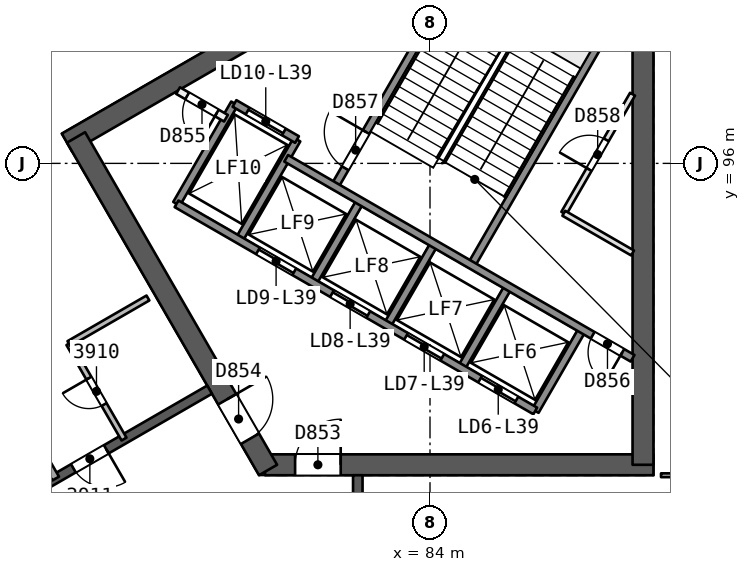
"""IFC4 building model, lengths in metres.
Left out: names, types, materials, properties, quantities, classifications, styles, units other than length and angle.
Written with IfcOpenShell. Run it as: python <this file> out.ifc"""

import sys

from ifc_helpers import new_model, si_unit, direction, frame, frame_2d, origin, place, context, subcontext, project, spatial, rectangle, extrude, element, fill, save


model = new_model("IFC4")
c1 = context("Model", 3, precision=1e-05, world=origin(), true_north=direction((0.0, 1.0)))
c2 = subcontext(c1, "Body", "Model", "MODEL_VIEW")
j1 = project(units=[si_unit("LENGTHUNIT", "METRE"), si_unit("PLANEANGLEUNIT", "RADIAN")], contexts=[c1])
p1 = place(None, origin())
s1 = spatial("IfcSite", under=j1, at=p1, CompositionType="ELEMENT")
p2 = place(p1, origin())
s2 = spatial("IfcBuilding", under=s1, at=p2, CompositionType="ELEMENT")
p3 = place(p2, frame((0.0, 0.0, 163.7)))
s3 = spatial("IfcBuildingStorey", under=s2, at=p3, CompositionType="ELEMENT", Elevation=163.7)
p4 = place(p3, frame((79.659, 88.069, 0.0), z_axis=(0.0, 0.0, 1.0), x_axis=(1.0, 0.0, 0.0)))
e1 = element("IfcWall", 1, at=p4, inside=s3, PredefinedType="SHEAR", context=c2, shape_type="SweptSolid", body=[
    extrude(rectangle(XDim=10.221, YDim=0.55, at=frame_2d((5.111, 0.0))), origin(), (0.0, 0.0, 1.0), 3.7),
])
p5 = place(p4, frame((0.791, 0.0, 0.0)))
e2 = element("IfcOpeningElement", 2, at=p5, cuts=e1, PredefinedType="OPENING", context=c2, shape_type="SweptSolid", body=[
    extrude(rectangle(XDim=1.2, YDim=2.1, at=frame_2d((0.6, 1.05))), frame((0.0, 0.286, 0.0), z_axis=(0.0, -1.0, 0.0), x_axis=(1.0, 0.0, 0.0)), (0.0, 0.0, 1.0), 0.571),
])
p6 = place(p3, frame((89.605, 88.069, 0.0), z_axis=(0.0, 0.0, 1.0), x_axis=(0.0, 1.0, 0.0)))
e3 = element("IfcWall", 3, at=p6, inside=s3, PredefinedType="SHEAR", context=c2, shape_type="SweptSolid", body=[
    extrude(rectangle(XDim=14.058, YDim=0.55, at=frame_2d((7.029, 0.0))), origin(), (0.0, 0.0, 1.0), 3.7),
])
p7 = place(p3, frame((86.723, 103.633, 0.0), z_axis=(0.0, 0.0, 1.0), x_axis=(-0.866023530946, -0.500003243837, 0.0)))
e4 = element("IfcWall", 4, at=p7, inside=s3, PredefinedType="SHEAR", context=c2, shape_type="SweptSolid", body=[
    extrude(rectangle(XDim=14.175, YDim=0.55, at=frame_2d((7.087, 0.0))), origin(), (0.0, 0.0, 1.0), 3.7),
])
p8 = place(p3, frame((74.686, 96.683, 0.0), z_axis=(0.0, 0.0, 1.0), x_axis=(0.499997818338, -0.866026663364, 0.0)))
e5 = element("IfcWall", 5, at=p8, inside=s3, PredefinedType="SHEAR", context=c2, shape_type="SweptSolid", body=[
    extrude(rectangle(XDim=10.105, YDim=0.55, at=frame_2d((5.052, 0.0))), origin(), (0.0, 0.0, 1.0), 3.7),
])
p9 = place(p8, frame((7.955, 0.0, 0.0)))
e6 = element("IfcOpeningElement", 6, at=p9, cuts=e5, PredefinedType="OPENING", context=c2, shape_type="SweptSolid", body=[
    extrude(rectangle(XDim=1.2, YDim=2.1, at=frame_2d((0.6, 1.05))), frame((0.0, 0.286, 0.0), z_axis=(0.0, -1.0, 0.0), x_axis=(1.0, 0.0, 0.0)), (0.0, 0.0, 1.0), 0.571),
])
p10 = place(p3, frame((82.1, 72.206, 0.0), z_axis=(0.0, 0.0, 1.0), x_axis=(0.0, 1.0, 0.0)))
e7 = element("IfcWall", 7, at=p10, inside=s3, PredefinedType="SHEAR", context=c2, shape_type="SweptSolid", body=[
    extrude(rectangle(XDim=15.588, YDim=0.25, at=frame_2d((7.794, 0.0))), origin(), (0.0, 0.0, 1.0), 3.25),
])
p11 = place(p10, frame((2.618, 0.0, 0.0)))
e8 = element("IfcOpeningElement", 8, at=p11, cuts=e7, PredefinedType="OPENING", context=c2, shape_type="SweptSolid", body=[
    extrude(rectangle(XDim=1.0, YDim=2.1, at=frame_2d((0.5, 1.05))), frame((0.0, 0.135, 0.0), z_axis=(0.0, -1.0, 0.0), x_axis=(1.0, 0.0, 0.0)), (0.0, 0.0, 1.0), 0.271),
])
p12 = place(p10, frame((8.285, 0.0, 0.0)))
e9 = element("IfcOpeningElement", 9, at=p12, cuts=e7, PredefinedType="OPENING", context=c2, shape_type="SweptSolid", body=[
    extrude(rectangle(XDim=1.2, YDim=2.4, at=frame_2d((0.6, 1.2))), frame((0.0, 0.135, 0.0), z_axis=(0.0, -1.0, 0.0), x_axis=(1.0, 0.0, 0.0)), (0.0, 0.0, 1.0), 0.271),
])
p13 = place(p10, frame((13.062, 0.0, 0.0)))
e10 = element("IfcOpeningElement", 10, at=p13, cuts=e7, PredefinedType="OPENING", context=c2, shape_type="SweptSolid", body=[
    extrude(rectangle(XDim=1.0, YDim=2.1, at=frame_2d((0.5, 1.05))), frame((0.0, 0.135, 0.0), z_axis=(0.0, -1.0, 0.0), x_axis=(1.0, 0.0, 0.0)), (0.0, 0.0, 1.0), 0.271),
])
p14 = place(p3, frame((78.2, 90.046, 0.0), z_axis=(0.0, 0.0, 1.0), x_axis=(-0.866026492143, -0.499998114903, 0.0)))
e11 = element("IfcWall", 11, at=p14, inside=s3, PredefinedType="SHEAR", context=c2, shape_type="SweptSolid", body=[
    extrude(rectangle(XDim=15.588, YDim=0.25, at=frame_2d((7.794, 0.0))), origin(), (0.0, 0.0, 1.0), 3.25),
])
p15 = place(p14, frame((3.138, 0.0, 0.0)))
e12 = element("IfcOpeningElement", 12, at=p15, cuts=e11, PredefinedType="OPENING", context=c2, shape_type="SweptSolid", body=[
    extrude(rectangle(XDim=1.0, YDim=2.1, at=frame_2d((0.5, 1.05))), frame((0.0, 0.135, 0.0), z_axis=(0.0, -1.0, 0.0), x_axis=(1.0, 0.0, 0.0)), (0.0, 0.0, 1.0), 0.271),
])
p16 = place(p14, frame((5.629, 0.0, 0.0)))
e13 = element("IfcOpeningElement", 13, at=p16, cuts=e11, PredefinedType="OPENING", context=c2, shape_type="SweptSolid", body=[
    extrude(rectangle(XDim=0.9, YDim=2.1, at=frame_2d((0.45, 1.05))), frame((0.0, 0.135, 0.0), z_axis=(0.0, -1.0, 0.0), x_axis=(1.0, 0.0, 0.0)), (0.0, 0.0, 1.0), 0.271),
])
p17 = place(p14, frame((8.435, 0.0, 0.0)))
e14 = element("IfcOpeningElement", 14, at=p17, cuts=e11, PredefinedType="OPENING", context=c2, shape_type="SweptSolid", body=[
    extrude(rectangle(XDim=0.9, YDim=2.1, at=frame_2d((0.45, 1.05))), frame((0.0, 0.135, 0.0), z_axis=(0.0, -1.0, 0.0), x_axis=(1.0, 0.0, 0.0)), (0.0, 0.0, 1.0), 0.271),
])
p18 = place(p14, frame((12.438, 0.0, 0.0)))
e15 = element("IfcOpeningElement", 15, at=p18, cuts=e11, PredefinedType="OPENING", context=c2, shape_type="SweptSolid", body=[
    extrude(rectangle(XDim=1.0, YDim=2.1, at=frame_2d((0.5, 1.05))), frame((0.0, 0.135, 0.0), z_axis=(0.0, -1.0, 0.0), x_axis=(1.0, 0.0, 0.0)), (0.0, 0.0, 1.0), 0.271),
])
p19 = place(p3, frame((93.652, 87.794, 0.0), z_axis=(0.0, 0.0, 1.0), x_axis=(-1.0, 0.0, 0.0)))
e16 = element("IfcWall", 16, at=p19, inside=s3, PredefinedType="PARTITIONING", context=c2, shape_type="SweptSolid", body=[
    extrude(rectangle(XDim=3.573, YDim=0.1, at=frame_2d((1.786, 0.0))), origin(), (0.0, 0.0, 1.0), 3.25),
])
p20 = place(p19, frame((1.336, 0.0, 0.0)))
e17 = element("IfcOpeningElement", 17, at=p20, cuts=e16, PredefinedType="OPENING", context=c2, shape_type="SweptSolid", body=[
    extrude(rectangle(XDim=0.9, YDim=2.1, at=frame_2d((0.45, 1.05))), frame((0.0, 0.061, 0.0), z_axis=(0.0, -1.0, 0.0), x_axis=(1.0, 0.0, 0.0)), (0.0, 0.0, 1.0), 0.121),
])
p21 = place(p3, frame((75.948, 88.746, 0.0), z_axis=(0.0, 0.0, 1.0), x_axis=(-0.499987231761, 0.866032775405, 0.0)))
e18 = element("IfcWall", 18, at=p21, inside=s3, PredefinedType="PARTITIONING", context=c2, shape_type="SweptSolid", body=[
    extrude(rectangle(XDim=2.9, YDim=0.15, at=frame_2d((1.45, 0.0))), origin(), (0.0, 0.0, 1.0), 3.25),
])
p22 = place(p21, frame((1.05, 0.0, 0.0)))
e19 = element("IfcOpeningElement", 19, at=p22, cuts=e18, PredefinedType="OPENING", context=c2, shape_type="SweptSolid", body=[
    extrude(rectangle(XDim=0.8, YDim=2.1, at=frame_2d((0.4, 1.05))), frame((0.0, 0.085, 0.0), z_axis=(0.0, -1.0, 0.0), x_axis=(1.0, 0.0, 0.0)), (0.0, 0.0, 1.0), 0.171),
])
p23 = place(p3, frame((74.498, 91.257, 0.0), z_axis=(0.0, 0.0, 1.0), x_axis=(0.866038271014, 0.499977712642, 0.0)))
e20 = element("IfcWall", 20, at=p23, inside=s3, PredefinedType="PARTITIONING", context=c2, shape_type="SweptSolid", body=[
    extrude(rectangle(XDim=2.401, YDim=0.15, at=frame_2d((1.2, 0.0))), origin(), (0.0, 0.0, 1.0), 3.25),
])
p24 = place(p3, frame((68.374, 97.712, 0.0), z_axis=(0.0, 0.0, 1.0), x_axis=(0.499998700539, -0.866026154027, 0.0)))
e21 = element("IfcWall", 21, at=p24, inside=s3, PredefinedType="PARTITIONING", context=c2, shape_type="SweptSolid", body=[
    extrude(rectangle(XDim=11.552, YDim=0.2, at=frame_2d((5.776, 0.0))), origin(), (0.0, 0.0, 1.0), 3.25),
])
p25 = place(p3, frame((42.189, 82.766, 0.0), z_axis=(0.0, 0.0, 1.0), x_axis=(0.866025862562, 0.499999205373, 0.0)))
e22 = element("IfcWall", 22, at=p25, inside=s3, PredefinedType="SOLIDWALL", context=c2, shape_type="SweptSolid", body=[
    extrude(rectangle(XDim=54.064, YDim=0.3, at=frame_2d((27.032, 0.0))), origin(), (0.0, 0.0, 1.0), 3.25),
])
p26 = place(p25, frame((20.688, 0.0, 0.0)))
e23 = element("IfcOpeningElement", 23, at=p26, cuts=e22, PredefinedType="OPENING", context=c2, shape_type="SweptSolid", body=[
    extrude(rectangle(XDim=2.4, YDim=2.4, at=frame_2d((1.2, 1.2))), frame((0.0, 0.161, 0.0), z_axis=(0.0, -1.0, 0.0), x_axis=(1.0, 0.0, 0.0)), (0.0, 0.0, 1.0), 0.321),
])
p27 = place(p25, frame((9.629, 0.0, 0.0)))
e24 = element("IfcOpeningElement", 24, at=p27, cuts=e22, PredefinedType="OPENING", context=c2, shape_type="SweptSolid", body=[
    extrude(rectangle(XDim=2.4, YDim=2.4, at=frame_2d((1.2, 1.2))), frame((0.0, 0.161, 0.0), z_axis=(0.0, -1.0, 0.0), x_axis=(1.0, 0.0, 0.0)), (0.0, 0.0, 1.0), 0.321),
])
p28 = place(p25, frame((40.951, 0.0, 0.0)))
e25 = element("IfcOpeningElement", 25, at=p28, cuts=e22, PredefinedType="OPENING", context=c2, shape_type="SweptSolid", body=[
    extrude(rectangle(XDim=2.4, YDim=2.4, at=frame_2d((1.2, 1.2))), frame((0.0, 0.161, 0.0), z_axis=(0.0, -1.0, 0.0), x_axis=(1.0, 0.0, 0.0)), (0.0, 0.0, 1.0), 0.321),
])
p29 = place(p25, frame((27.847, 0.0, 0.9)))
e26 = element("IfcOpeningElement", 26, at=p29, cuts=e22, PredefinedType="OPENING", context=c2, shape_type="SweptSolid", body=[
    extrude(rectangle(XDim=1.8, YDim=1.5, at=frame_2d((0.9, 0.75))), frame((0.0, 0.161, 0.0), z_axis=(0.0, -1.0, 0.0), x_axis=(1.0, 0.0, 0.0)), (0.0, 0.0, 1.0), 0.321),
])
p30 = place(p25, frame((25.041, 0.0, 0.9)))
e27 = element("IfcOpeningElement", 27, at=p30, cuts=e22, PredefinedType="OPENING", context=c2, shape_type="SweptSolid", body=[
    extrude(rectangle(XDim=1.8, YDim=1.5, at=frame_2d((0.9, 0.75))), frame((0.0, 0.161, 0.0), z_axis=(0.0, -1.0, 0.0), x_axis=(1.0, 0.0, 0.0)), (0.0, 0.0, 1.0), 0.321),
])
p31 = place(p3, frame((86.77, 89.486, 0.0), z_axis=(0.0, 0.0, 1.0), x_axis=(0.499961042966, 0.86604789447, 0.0)))
e28 = element("IfcWall", 28, at=p31, inside=s3, PredefinedType="SOLIDWALL", context=c2, shape_type="SweptSolid", body=[
    extrude(rectangle(XDim=2.48, YDim=0.2, at=frame_2d((1.24, 0.0))), origin(), (0.0, 0.0, 1.0), 3.25),
])
p32 = place(p3, frame((87.521, 94.687, 0.0), z_axis=(0.0, 0.0, 1.0), x_axis=(0.500043727655, 0.866000156139, 0.0)))
e29 = element("IfcWall", 29, at=p32, inside=s3, PredefinedType="PARTITIONING", context=c2, shape_type="SweptSolid", body=[
    extrude(rectangle(XDim=3.618, YDim=0.15, at=frame_2d((1.809, 0.0))), origin(), (0.0, 0.0, 1.0), 3.25),
])
p33 = place(p32, frame((1.332, 0.0, 0.0)))
e30 = element("IfcOpeningElement", 30, at=p33, cuts=e29, PredefinedType="OPENING", context=c2, shape_type="SweptSolid", body=[
    extrude(rectangle(XDim=0.9, YDim=2.1, at=frame_2d((0.45, 1.05))), frame((0.0, 0.085, 0.0), z_axis=(0.0, -1.0, 0.0), x_axis=(1.0, 0.0, 0.0)), (0.0, 0.0, 1.0), 0.171),
])
p34 = place(p3, frame((84.821, 90.611, 0.0), z_axis=(0.0, 0.0, 1.0), x_axis=(0.499961042966, 0.86604789447, 0.0)))
e31 = element("IfcWall", 31, at=p34, inside=s3, PredefinedType="SOLIDWALL", context=c2, shape_type="SweptSolid", body=[
    extrude(rectangle(XDim=2.48, YDim=0.2, at=frame_2d((1.24, 0.0))), origin(), (0.0, 0.0, 1.0), 3.25),
])
p35 = place(p3, frame((85.087, 93.321, 0.0), z_axis=(0.0, 0.0, 1.0), x_axis=(0.500019787375, 0.866013979237, 0.0)))
e32 = element("IfcWall", 32, at=p35, inside=s3, PredefinedType="SOLIDWALL", context=c2, shape_type="SweptSolid", body=[
    extrude(rectangle(XDim=7.7, YDim=0.2, at=frame_2d((3.85, 0.0))), origin(), (0.0, 0.0, 1.0), 3.25),
])
for number, where, z_axis, x_axis in (
    (33, (82.873, 91.736, 0.0), (0.0, 0.0, 1.0), (0.5, 0.866, 0.0)),
    (34, (80.924, 92.861, 0.0), (0.0, 0.0, 1.0), (0.5, 0.866, 0.0)),
):
    element("IfcWall", number, at=place(p3, frame(where, z_axis=z_axis, x_axis=x_axis)), inside=s3, PredefinedType="SOLIDWALL", context=c2, shape_type="SweptSolid", body=[
        extrude(rectangle(XDim=2.48, YDim=0.2, at=frame_2d((1.24, 0.0))), origin(), (0.0, 0.0, 1.0), 3.25),
    ])
p36 = place(p3, frame((81.493, 95.396, 0.0), z_axis=(0.0, 0.0, 1.0), x_axis=(0.500006057782, 0.866021906294, 0.0)))
e35 = element("IfcWall", 35, at=p36, inside=s3, PredefinedType="SOLIDWALL", context=c2, shape_type="SweptSolid", body=[
    extrude(rectangle(XDim=7.7, YDim=0.2, at=frame_2d((3.85, 0.0))), origin(), (0.0, 0.0, 1.0), 3.25),
])
p37 = place(p36, frame((0.55, 0.0, 0.0)))
e36 = element("IfcOpeningElement", 36, at=p37, cuts=e35, PredefinedType="OPENING", context=c2, shape_type="SweptSolid", body=[
    extrude(rectangle(XDim=1.1, YDim=2.1, at=frame_2d((0.55, 1.05))), frame((0.0, 0.11, 0.0), z_axis=(0.0, -1.0, 0.0), x_axis=(1.0, 0.0, 0.0)), (0.0, 0.0, 1.0), 0.221),
])
for number, where, z_axis, x_axis in (
    (37, (78.976, 93.986, 0.0), (0.0, 0.0, 1.0), (0.5, 0.866, 0.0)),
    (38, (77.33, 94.936, 0.0), (0.0, 0.0, 1.0), (0.5, 0.866, 0.0)),
):
    element("IfcWall", number, at=place(p3, frame(where, z_axis=z_axis, x_axis=x_axis)), inside=s3, PredefinedType="SOLIDWALL", context=c2, shape_type="SweptSolid", body=[
        extrude(rectangle(XDim=3.05, YDim=0.2, at=frame_2d((1.525, 0.0))), origin(), (0.0, 0.0, 1.0), 3.25),
    ])
p38 = place(p3, frame((86.77, 89.486, 0.0), z_axis=(0.0, 0.0, 1.0), x_axis=(-0.86601811187, 0.500012629753, 0.0)))
e39 = element("IfcWall", 39, at=p38, inside=s3, PredefinedType="SOLIDWALL", context=c2, shape_type="SweptSolid", body=[
    extrude(rectangle(XDim=10.9, YDim=0.2, at=frame_2d((5.45, 0.0))), origin(), (0.0, 0.0, 1.0), 3.25),
])
p39 = place(p38, frame((0.575, 0.0, 0.0)))
e40 = element("IfcOpeningElement", 40, at=p39, cuts=e39, PredefinedType="OPENING", context=c2, shape_type="SweptSolid", body=[
    extrude(rectangle(XDim=1.1, YDim=2.1, at=frame_2d((0.55, 1.05))), frame((0.0, 0.11, 0.0), z_axis=(0.0, -1.0, 0.0), x_axis=(1.0, 0.0, 0.0)), (0.0, 0.0, 1.0), 0.221),
])
p40 = place(p38, frame((2.825, 0.0, 0.0)))
e41 = element("IfcOpeningElement", 41, at=p40, cuts=e39, PredefinedType="OPENING", context=c2, shape_type="SweptSolid", body=[
    extrude(rectangle(XDim=1.1, YDim=2.1, at=frame_2d((0.55, 1.05))), frame((0.0, 0.11, 0.0), z_axis=(0.0, -1.0, 0.0), x_axis=(1.0, 0.0, 0.0)), (0.0, 0.0, 1.0), 0.221),
])
p41 = place(p38, frame((5.075, 0.0, 0.0)))
e42 = element("IfcOpeningElement", 42, at=p41, cuts=e39, PredefinedType="OPENING", context=c2, shape_type="SweptSolid", body=[
    extrude(rectangle(XDim=1.1, YDim=2.1, at=frame_2d((0.55, 1.05))), frame((0.0, 0.11, 0.0), z_axis=(0.0, -1.0, 0.0), x_axis=(1.0, 0.0, 0.0)), (0.0, 0.0, 1.0), 0.221),
])
p42 = place(p38, frame((7.325, 0.0, 0.0)))
e43 = element("IfcOpeningElement", 43, at=p42, cuts=e39, PredefinedType="OPENING", context=c2, shape_type="SweptSolid", body=[
    extrude(rectangle(XDim=1.1, YDim=2.1, at=frame_2d((0.55, 1.05))), frame((0.0, 0.11, 0.0), z_axis=(0.0, -1.0, 0.0), x_axis=(1.0, 0.0, 0.0)), (0.0, 0.0, 1.0), 0.221),
])
p43 = place(p3, frame((89.33, 90.872, 0.0), z_axis=(0.0, 0.0, 1.0), x_axis=(-0.866027589512, 0.49999621419, 0.0)))
e44 = element("IfcWall", 44, at=p43, inside=s3, PredefinedType="SOLIDWALL", context=c2, shape_type="SweptSolid", body=[
    extrude(rectangle(XDim=10.524, YDim=0.2, at=frame_2d((5.262, 0.0))), origin(), (0.0, 0.0, 1.0), 3.25),
])
p44 = place(p43, frame((0.312, 0.0, 0.0)))
e45 = element("IfcOpeningElement", 45, at=p44, cuts=e44, PredefinedType="OPENING", context=c2, shape_type="SweptSolid", body=[
    extrude(rectangle(XDim=0.9, YDim=2.1, at=frame_2d((0.45, 1.05))), frame((0.0, 0.11, 0.0), z_axis=(0.0, -1.0, 0.0), x_axis=(1.0, 0.0, 0.0)), (0.0, 0.0, 1.0), 0.221),
])
p45 = place(p3, frame((78.63, 97.188, 0.0), z_axis=(0.0, 0.0, 1.0), x_axis=(-0.866003949776, 0.500037157592, 0.0)))
e46 = element("IfcWall", 46, at=p45, inside=s3, PredefinedType="PARTITIONING", context=c2, shape_type="SweptSolid", body=[
    extrude(rectangle(XDim=1.455, YDim=0.2, at=frame_2d((0.728, 0.0))), origin(), (0.0, 0.0, 1.0), 3.25),
])
p46 = place(p45, frame((0.278, 0.0, 0.0)))
e47 = element("IfcOpeningElement", 47, at=p46, cuts=e46, PredefinedType="OPENING", context=c2, shape_type="SweptSolid", body=[
    extrude(rectangle(XDim=0.9, YDim=2.1, at=frame_2d((0.45, 1.05))), frame((0.0, 0.11, 0.0), z_axis=(0.0, -1.0, 0.0), x_axis=(1.0, 0.0, 0.0)), (0.0, 0.0, 1.0), 0.221),
])
p47 = place(p3, frame((80.5, 96.627, 0.0), z_axis=(0.0, 0.0, 1.0), x_axis=(-0.86601224135, 0.500022797313, 0.0)))
e48 = element("IfcWall", 48, at=p47, inside=s3, PredefinedType="SOLIDWALL", context=c2, shape_type="SweptSolid", body=[
    extrude(rectangle(XDim=1.9, YDim=0.2, at=frame_2d((0.95, 0.0))), origin(), (0.0, 0.0, 1.0), 3.25),
])
p48 = place(p47, frame((0.4, 0.0, 0.0)))
e49 = element("IfcOpeningElement", 49, at=p48, cuts=e48, PredefinedType="OPENING", context=c2, shape_type="SweptSolid", body=[
    extrude(rectangle(XDim=1.1, YDim=2.1, at=frame_2d((0.55, 1.05))), frame((0.0, 0.11, 0.0), z_axis=(0.0, -1.0, 0.0), x_axis=(1.0, 0.0, 0.0)), (0.0, 0.0, 1.0), 0.221),
])
p49 = place(p3, frame((89.33, 93.643, 0.0), z_axis=(0.0, 0.0, 1.0), x_axis=(-0.866033778982, 0.499985493453, 0.0)))
e50 = element("IfcWall", 50, at=p49, inside=s3, PredefinedType="PARTITIONING", context=c2, shape_type="SweptSolid", body=[
    extrude(rectangle(XDim=2.089, YDim=0.15, at=frame_2d((1.044, 0.0))), origin(), (0.0, 0.0, 1.0), 3.25),
])
p50 = place(p22, origin())
e51 = element("IfcDoor", 51, at=p50, inside=s3, OperationType="SINGLE_SWING_RIGHT", PredefinedType="NOTDEFINED", context=c2, shape_type="SweptSolid", body=[
    extrude(rectangle(XDim=0.8, YDim=2.1, at=frame_2d((0.4, 1.05))), frame((0.0, 0.025, 0.0), z_axis=(0.0, -1.0, 0.0), x_axis=(1.0, 0.0, 0.0)), (0.0, 0.0, 1.0), 0.05),
])
fill(e19, e51)
p51 = place(p15, origin())
e52 = element("IfcDoor", 52, at=p51, inside=s3, OperationType="SINGLE_SWING_LEFT", PredefinedType="NOTDEFINED", context=c2, shape_type="SweptSolid", body=[
    extrude(rectangle(XDim=1.0, YDim=2.1, at=frame_2d((0.5, 1.05))), frame((0.0, 0.025, 0.0), z_axis=(0.0, -1.0, 0.0), x_axis=(1.0, 0.0, 0.0)), (0.0, 0.0, 1.0), 0.05),
])
fill(e12, e52)
p52 = place(p5, origin())
e53 = element("IfcDoor", 53, at=p52, inside=s3, OperationType="SINGLE_SWING_RIGHT", PredefinedType="NOTDEFINED", context=c2, shape_type="SweptSolid", body=[
    extrude(rectangle(XDim=1.2, YDim=2.1, at=frame_2d((0.6, 1.05))), frame((0.0, 0.025, 0.0), z_axis=(0.0, -1.0, 0.0), x_axis=(1.0, 0.0, 0.0)), (0.0, 0.0, 1.0), 0.05),
])
fill(e2, e53)
p53 = place(p9, origin())
e54 = element("IfcDoor", 54, at=p53, inside=s3, OperationType="SINGLE_SWING_LEFT", PredefinedType="NOTDEFINED", context=c2, shape_type="SweptSolid", body=[
    extrude(rectangle(XDim=1.2, YDim=2.1, at=frame_2d((0.6, 1.05))), frame((0.0, 0.025, 0.0), z_axis=(0.0, -1.0, 0.0), x_axis=(1.0, 0.0, 0.0)), (0.0, 0.0, 1.0), 0.05),
])
fill(e6, e54)
p54 = place(p39, origin())
e55 = element("IfcDoor", 55, at=p54, inside=s3, OperationType="SLIDING_TO_RIGHT", PredefinedType="NOTDEFINED", context=c2, shape_type="SweptSolid", body=[
    extrude(rectangle(XDim=1.1, YDim=2.1, at=frame_2d((0.55, 1.05))), frame((0.0, 0.025, 0.0), z_axis=(0.0, -1.0, 0.0), x_axis=(1.0, 0.0, 0.0)), (0.0, 0.0, 1.0), 0.05),
])
fill(e40, e55)
p55 = place(p40, origin())
e56 = element("IfcDoor", 56, at=p55, inside=s3, OperationType="SLIDING_TO_LEFT", PredefinedType="NOTDEFINED", context=c2, shape_type="SweptSolid", body=[
    extrude(rectangle(XDim=1.1, YDim=2.1, at=frame_2d((0.55, 1.05))), frame((0.0, 0.025, 0.0), z_axis=(0.0, -1.0, 0.0), x_axis=(1.0, 0.0, 0.0)), (0.0, 0.0, 1.0), 0.05),
])
fill(e41, e56)
p56 = place(p41, origin())
e57 = element("IfcDoor", 57, at=p56, inside=s3, OperationType="SLIDING_TO_RIGHT", PredefinedType="NOTDEFINED", context=c2, shape_type="SweptSolid", body=[
    extrude(rectangle(XDim=1.1, YDim=2.1, at=frame_2d((0.55, 1.05))), frame((0.0, 0.025, 0.0), z_axis=(0.0, -1.0, 0.0), x_axis=(1.0, 0.0, 0.0)), (0.0, 0.0, 1.0), 0.05),
])
fill(e42, e57)
p57 = place(p42, origin())
e58 = element("IfcDoor", 58, at=p57, inside=s3, OperationType="SLIDING_TO_LEFT", PredefinedType="NOTDEFINED", context=c2, shape_type="SweptSolid", body=[
    extrude(rectangle(XDim=1.1, YDim=2.1, at=frame_2d((0.55, 1.05))), frame((0.0, 0.025, 0.0), z_axis=(0.0, -1.0, 0.0), x_axis=(1.0, 0.0, 0.0)), (0.0, 0.0, 1.0), 0.05),
])
fill(e43, e58)
p58 = place(p48, origin())
e59 = element("IfcDoor", 59, at=p58, inside=s3, OperationType="SLIDING_TO_RIGHT", PredefinedType="NOTDEFINED", context=c2, shape_type="SweptSolid", body=[
    extrude(rectangle(XDim=1.1, YDim=2.1, at=frame_2d((0.55, 1.05))), frame((0.0, 0.025, 0.0), z_axis=(0.0, -1.0, 0.0), x_axis=(1.0, 0.0, 0.0)), (0.0, 0.0, 1.0), 0.05),
])
fill(e49, e59)
p59 = place(p46, origin())
e60 = element("IfcDoor", 60, at=p59, inside=s3, OperationType="SINGLE_SWING_LEFT", PredefinedType="NOTDEFINED", context=c2, shape_type="SweptSolid", body=[
    extrude(rectangle(XDim=0.9, YDim=2.1, at=frame_2d((0.45, 1.05))), frame((0.0, 0.025, 0.0), z_axis=(0.0, -1.0, 0.0), x_axis=(1.0, 0.0, 0.0)), (0.0, 0.0, 1.0), 0.05),
])
fill(e47, e60)
p60 = place(p44, origin())
e61 = element("IfcDoor", 61, at=p60, inside=s3, OperationType="SINGLE_SWING_LEFT", PredefinedType="NOTDEFINED", context=c2, shape_type="SweptSolid", body=[
    extrude(rectangle(XDim=0.9, YDim=2.1, at=frame_2d((0.45, 1.05))), frame((0.0, 0.025, 0.0), z_axis=(0.0, -1.0, 0.0), x_axis=(1.0, 0.0, 0.0)), (0.0, 0.0, 1.0), 0.05),
])
fill(e45, e61)
p61 = place(p37, origin())
e62 = element("IfcDoor", 62, at=p61, inside=s3, OperationType="SINGLE_SWING_RIGHT", PredefinedType="NOTDEFINED", context=c2, shape_type="SweptSolid", body=[
    extrude(rectangle(XDim=1.1, YDim=2.1, at=frame_2d((0.55, 1.05))), frame((0.0, 0.025, 0.0), z_axis=(0.0, -1.0, 0.0), x_axis=(1.0, 0.0, 0.0)), (0.0, 0.0, 1.0), 0.05),
])
fill(e36, e62)
p62 = place(p33, origin())
e63 = element("IfcDoor", 63, at=p62, inside=s3, OperationType="SINGLE_SWING_LEFT", PredefinedType="NOTDEFINED", context=c2, shape_type="SweptSolid", body=[
    extrude(rectangle(XDim=0.9, YDim=2.1, at=frame_2d((0.45, 1.05))), frame((0.0, 0.025, 0.0), z_axis=(0.0, -1.0, 0.0), x_axis=(1.0, 0.0, 0.0)), (0.0, 0.0, 1.0), 0.05),
])
fill(e30, e63)
save(model, sys.argv[1])
